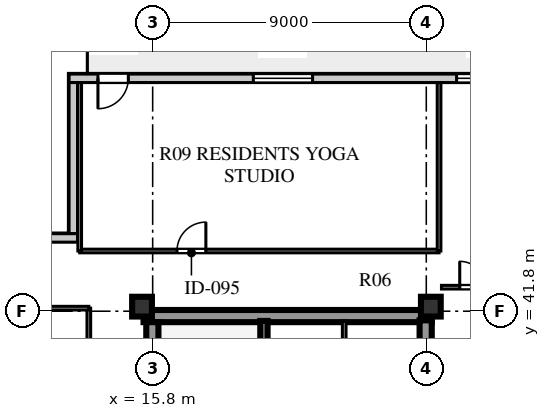
"""IFC4 building model, lengths in metres.
Left out: names, types, materials, properties, quantities, classifications, styles, units other than length and angle.
Written with IfcOpenShell. Run it as: python <this file> out.ifc"""

import sys

from ifc_helpers import new_model, si_unit, direction, frame, frame_2d, origin, origin_2d, place, context, subcontext, project, spatial, rectangle, extrude, element, fill, save


model = new_model("IFC4")
c1 = context("Model", 3, precision=1e-05, world=origin(), true_north=direction((0.0, 1.0)))
c2 = subcontext(c1, "Body", "Model", "MODEL_VIEW")
j1 = project(units=[si_unit("LENGTHUNIT", "METRE"), si_unit("PLANEANGLEUNIT", "RADIAN")], contexts=[c1])
p1 = place(None, origin())
s1 = spatial("IfcSite", under=j1, at=p1, CompositionType="ELEMENT")
p2 = place(p1, origin())
s2 = spatial("IfcBuilding", under=s1, at=p2, CompositionType="ELEMENT")
p3 = place(p2, frame((0.0, 0.0, 214.1)))
s3 = spatial("IfcBuildingStorey", under=s2, at=p3, CompositionType="ELEMENT", Elevation=214.1)
p4 = place(p3, frame((15.5, 41.64, 0.0), z_axis=(0.0, 0.0, 1.0), x_axis=(1.0, 0.0, 0.0)))
e1 = element("IfcWall", 1, at=p4, inside=s3, PredefinedType="SHEAR", context=c2, shape_type="SweptSolid", body=[
    extrude(rectangle(XDim=9.48, YDim=0.4, at=frame_2d((4.74, 0.0))), origin(), (0.0, 0.0, 1.0), 3.66),
])
p5 = place(p3, frame((15.79, 15.81, 0.0), z_axis=(0.0, 0.0, 1.0), x_axis=(0.0, 1.0, 0.0)))
e2 = element("IfcWall", 2, at=p5, inside=s3, PredefinedType="SHEAR", context=c2, shape_type="SweptSolid", body=[
    extrude(rectangle(XDim=25.63, YDim=0.4, at=frame_2d((12.815, 0.0))), origin(), (0.0, 0.0, 1.0), 3.66),
])
p6 = place(p3, frame((24.78, 15.74, 0.0), z_axis=(0.0, 0.0, 1.0), x_axis=(0.0, 1.0, 0.0)))
e3 = element("IfcWall", 3, at=p6, inside=s3, PredefinedType="SHEAR", context=c2, shape_type="SweptSolid", body=[
    extrude(rectangle(XDim=25.76, YDim=0.4, at=frame_2d((12.88, 0.0))), origin(), (0.0, 0.0, 1.0), 3.66),
])
p7 = place(p6, frame((1.61, 0.0, 0.0)))
e4 = element("IfcOpeningElement", 4, at=p7, cuts=e3, PredefinedType="OPENING", context=c2, shape_type="SweptSolid", body=[
    extrude(rectangle(XDim=1.2, YDim=2.1, at=frame_2d((0.6, 1.05))), frame((0.0, 0.21, 0.0), z_axis=(0.0, -1.0, 0.0), x_axis=(1.0, 0.0, 0.0)), (0.0, 0.0, 1.0), 0.42),
])
p8 = place(p6, frame((6.78, 0.0, 0.0)))
e5 = element("IfcOpeningElement", 5, at=p8, cuts=e3, PredefinedType="OPENING", context=c2, shape_type="SweptSolid", body=[
    extrude(rectangle(XDim=0.85, YDim=2.06, at=frame_2d((0.425, 1.03))), frame((0.0, 0.21, 0.0), z_axis=(0.0, -1.0, 0.0), x_axis=(1.0, 0.0, 0.0)), (0.0, 0.0, 1.0), 0.42),
])
p9 = place(p6, frame((12.11, 0.0, 0.0)))
e6 = element("IfcOpeningElement", 6, at=p9, cuts=e3, PredefinedType="OPENING", context=c2, shape_type="SweptSolid", body=[
    extrude(rectangle(XDim=1.5, YDim=2.12, at=frame_2d((0.75, 1.06))), frame((0.0, 0.21, 0.0), z_axis=(0.0, -1.0, 0.0), x_axis=(1.0, 0.0, 0.0)), (0.0, 0.0, 1.0), 0.42),
])
p10 = place(p6, frame((20.11, 0.0, 0.0)))
e7 = element("IfcOpeningElement", 7, at=p10, cuts=e3, PredefinedType="OPENING", context=c2, shape_type="SweptSolid", body=[
    extrude(rectangle(XDim=1.2, YDim=2.12, at=frame_2d((0.6, 1.06))), frame((0.0, 0.21, 0.0), z_axis=(0.0, -1.0, 0.0), x_axis=(1.0, 0.0, 0.0)), (0.0, 0.0, 1.0), 0.42),
])
p11 = place(p6, frame((24.01, 0.0, 0.0)))
e8 = element("IfcOpeningElement", 8, at=p11, cuts=e3, PredefinedType="OPENING", context=c2, shape_type="SweptSolid", body=[
    extrude(rectangle(XDim=0.95, YDim=2.1, at=frame_2d((0.475, 1.05))), frame((0.0, 0.21, 0.0), z_axis=(0.0, -1.0, 0.0), x_axis=(1.0, 0.0, 0.0)), (0.0, 0.0, 1.0), 0.42),
])
for number, where, z_axis, x_axis in (
    (9, (15.45, 41.95, 0.0), (0.0, 0.0, 1.0), (1.0, 0.0, 0.0)),
    (10, (24.95, 41.95, 0.0), (0.0, 0.0, 1.0), (1.0, 0.0, 0.0)),
):
    element("IfcColumn", number, at=place(p3, frame(where, z_axis=z_axis, x_axis=x_axis)), inside=s3, PredefinedType="COLUMN", context=c2, shape_type="SweptSolid", body=[
        extrude(rectangle(XDim=0.65, YDim=0.65, at=origin_2d()), origin(), (0.0, 0.0, 1.0), 3.66),
    ])
p12 = place(p3, frame((45.55, 49.46, 0.0), z_axis=(0.0, 0.0, 1.0), x_axis=(-1.0, 0.0, 0.0)))
e11 = element("IfcWall", 11, at=p12, inside=s3, PredefinedType="STANDARD", context=c2, shape_type="SweptSolid", body=[
    extrude(rectangle(XDim=32.5, YDim=0.28, at=frame_2d((16.25, 0.0))), origin(), (0.0, 0.0, 1.0), 3.66),
])
p13 = place(p12, frame((30.55, 0.0, 0.0)))
e12 = element("IfcOpeningElement", 12, at=p13, cuts=e11, PredefinedType="OPENING", context=c2, shape_type="SweptSolid", body=[
    extrude(rectangle(XDim=1.0, YDim=2.05, at=frame_2d((0.5, 1.025))), frame((0.0, 0.15, 0.0), z_axis=(0.0, -1.0, 0.0), x_axis=(1.0, 0.0, 0.0)), (0.0, 0.0, 1.0), 0.3),
])
p14 = place(p12, frame((24.49, 0.0, 0.8)))
e13 = element("IfcOpeningElement", 13, at=p14, cuts=e11, PredefinedType="OPENING", context=c2, shape_type="SweptSolid", body=[
    extrude(rectangle(XDim=1.95, YDim=2.0, at=frame_2d((0.975, 1.0))), frame((0.0, 0.15, 0.0), z_axis=(0.0, -1.0, 0.0), x_axis=(1.0, 0.0, 0.0)), (0.0, 0.0, 1.0), 0.3),
])
p15 = place(p12, frame((17.503, 0.0, 0.8)))
e14 = element("IfcOpeningElement", 14, at=p15, cuts=e11, PredefinedType="OPENING", context=c2, shape_type="SweptSolid", body=[
    extrude(rectangle(XDim=2.25, YDim=2.0, at=frame_2d((1.125, 1.0))), frame((0.0, 0.15, 0.0), z_axis=(0.0, -1.0, 0.0), x_axis=(1.0, 0.0, 0.0)), (0.0, 0.0, 1.0), 0.3),
])
p16 = place(p12, frame((12.978, 0.0, 0.8)))
e15 = element("IfcOpeningElement", 15, at=p16, cuts=e11, PredefinedType="OPENING", context=c2, shape_type="SweptSolid", body=[
    extrude(rectangle(XDim=1.8, YDim=2.0, at=frame_2d((0.9, 1.0))), frame((0.0, 0.15, 0.0), z_axis=(0.0, -1.0, 0.0), x_axis=(1.0, 0.0, 0.0)), (0.0, 0.0, 1.0), 0.3),
])
p17 = place(p12, frame((4.72, 0.0, 0.8)))
e16 = element("IfcOpeningElement", 16, at=p17, cuts=e11, PredefinedType="OPENING", context=c2, shape_type="SweptSolid", body=[
    extrude(rectangle(XDim=1.5, YDim=2.0, at=frame_2d((0.75, 1.0))), frame((0.0, 0.15, 0.0), z_axis=(0.0, -1.0, 0.0), x_axis=(1.0, 0.0, 0.0)), (0.0, 0.0, 1.0), 0.3),
])
p18 = place(p3, frame((13.19, 49.32, 0.0), z_axis=(0.0, 0.0, 1.0), x_axis=(0.0, -1.0, 0.0)))
e17 = element("IfcWall", 17, at=p18, inside=s3, PredefinedType="STANDARD", context=c2, shape_type="SweptSolid", body=[
    extrude(rectangle(XDim=4.97, YDim=0.28, at=frame_2d((2.485, 0.0))), origin(), (0.0, 0.0, 1.0), 3.66),
])
p19 = place(p3, frame((13.33, 44.21, 0.0), z_axis=(0.0, 0.0, 1.0), x_axis=(-1.0, 0.0, 0.0)))
e18 = element("IfcWall", 18, at=p19, inside=s3, PredefinedType="STANDARD", context=c2, shape_type="SweptSolid", body=[
    extrude(rectangle(XDim=5.53, YDim=0.28, at=frame_2d((2.765, 0.0))), origin(), (0.0, 0.0, 1.0), 3.66),
])
p20 = place(p3, frame((19.46, 33.3, 0.0), z_axis=(0.0, 0.0, 1.0), x_axis=(0.0, 1.0, 0.0)))
e19 = element("IfcWall", 19, at=p20, inside=s3, PredefinedType="SHEAR", context=c2, shape_type="SweptSolid", body=[
    extrude(rectangle(XDim=8.18, YDim=0.24, at=frame_2d((4.09, 0.0))), origin(), (0.0, 0.0, 1.0), 3.9),
])
p21 = place(p20, frame((0.65, 0.0, 0.0)))
e20 = element("IfcOpeningElement", 20, at=p21, cuts=e19, PredefinedType="OPENING", context=c2, shape_type="SweptSolid", body=[
    extrude(rectangle(XDim=1.1, YDim=2.1, at=frame_2d((0.55, 1.05))), frame((0.0, 0.13, 0.0), z_axis=(0.0, -1.0, 0.0), x_axis=(1.0, 0.0, 0.0)), (0.0, 0.0, 1.0), 0.26),
])
p22 = place(p3, frame((22.1, 39.4, 0.0), z_axis=(0.0, 0.0, 1.0), x_axis=(0.0, 1.0, 0.0)))
e21 = element("IfcWall", 21, at=p22, inside=s3, PredefinedType="PARTITIONING", context=c2, shape_type="SweptSolid", body=[
    extrude(rectangle(XDim=2.08, YDim=0.12, at=frame_2d((1.04, 0.0))), origin(), (0.0, 0.0, 1.0), 3.66),
])
p23 = place(p22, frame((0.55, 0.0, 0.0)))
e22 = element("IfcOpeningElement", 22, at=p23, cuts=e21, PredefinedType="OPENING", context=c2, shape_type="SweptSolid", body=[
    extrude(rectangle(XDim=0.85, YDim=2.06, at=frame_2d((0.425, 1.03))), frame((0.0, 0.07, 0.0), z_axis=(0.0, -1.0, 0.0), x_axis=(1.0, 0.0, 0.0)), (0.0, 0.0, 1.0), 0.14),
])
p24 = place(p3, frame((13.4, 43.78, 0.0), z_axis=(0.0, 0.0, 1.0), x_axis=(1.0, 0.0, 0.0)))
e23 = element("IfcWall", 23, at=p24, inside=s3, PredefinedType="PARTITIONING", context=c2, shape_type="SweptSolid", body=[
    extrude(rectangle(XDim=11.82, YDim=0.12, at=frame_2d((5.91, 0.0))), origin(), (0.0, 0.0, 1.0), 3.66),
])
p25 = place(p24, frame((3.2, 0.0, 0.0)))
e24 = element("IfcOpeningElement", 24, at=p25, cuts=e23, PredefinedType="OPENING", context=c2, shape_type="SweptSolid", body=[
    extrude(rectangle(XDim=0.95, YDim=2.08, at=frame_2d((0.475, 1.04))), frame((0.0, 0.07, 0.0), z_axis=(0.0, -1.0, 0.0), x_axis=(1.0, 0.0, 0.0)), (0.0, 0.0, 1.0), 0.14),
])
p26 = place(p3, frame((13.4, 43.78, 0.0), z_axis=(0.0, 0.0, 1.0), x_axis=(0.0, 1.0, 0.0)))
e25 = element("IfcWall", 25, at=p26, inside=s3, PredefinedType="PARTITIONING", context=c2, shape_type="SweptSolid", body=[
    extrude(rectangle(XDim=5.54, YDim=0.12, at=frame_2d((2.77, 0.0))), origin(), (0.0, 0.0, 1.0), 3.66),
])
p27 = place(p3, frame((25.22, 43.78, 0.0), z_axis=(0.0, 0.0, 1.0), x_axis=(0.0, 1.0, 0.0)))
e26 = element("IfcWall", 26, at=p27, inside=s3, PredefinedType="PARTITIONING", context=c2, shape_type="SweptSolid", body=[
    extrude(rectangle(XDim=5.54, YDim=0.12, at=frame_2d((2.77, 0.0))), origin(), (0.0, 0.0, 1.0), 3.21),
])
p28 = place(p3, frame((13.7, 15.3, 0.0), z_axis=(0.0, 0.0, 1.0), x_axis=(0.0, 1.0, 0.0)))
e27 = element("IfcWall", 27, at=p28, inside=s3, PredefinedType="PARTITIONING", context=c2, shape_type="SweptSolid", body=[
    extrude(rectangle(XDim=26.6, YDim=0.12, at=frame_2d((13.3, 0.0))), origin(), (0.0, 0.0, 1.0), 3.66),
])
p29 = place(p28, frame((0.65, 0.0, 0.0)))
e28 = element("IfcOpeningElement", 28, at=p29, cuts=e27, PredefinedType="OPENING", context=c2, shape_type="SweptSolid", body=[
    extrude(rectangle(XDim=0.95, YDim=2.1, at=frame_2d((0.475, 1.05))), frame((0.0, 0.07, 0.0), z_axis=(0.0, -1.0, 0.0), x_axis=(1.0, 0.0, 0.0)), (0.0, 0.0, 1.0), 0.14),
])
p30 = place(p28, frame((13.95, 0.0, 0.0)))
e29 = element("IfcOpeningElement", 29, at=p30, cuts=e27, PredefinedType="OPENING", context=c2, shape_type="SweptSolid", body=[
    extrude(rectangle(XDim=0.95, YDim=2.1, at=frame_2d((0.475, 1.05))), frame((0.0, 0.07, 0.0), z_axis=(0.0, -1.0, 0.0), x_axis=(1.0, 0.0, 0.0)), (0.0, 0.0, 1.0), 0.14),
])
p31 = place(p3, frame((8.08, 41.9, 0.0), z_axis=(0.0, 0.0, 1.0), x_axis=(1.0, 0.0, 0.0)))
e30 = element("IfcWall", 30, at=p31, inside=s3, PredefinedType="PARTITIONING", context=c2, shape_type="SweptSolid", body=[
    extrude(rectangle(XDim=5.62, YDim=0.12, at=frame_2d((2.81, 0.0))), origin(), (0.0, 0.0, 1.0), 3.21),
])
p32 = place(p3, frame((25.3, 42.59, 0.0), z_axis=(0.0, 0.0, 1.0), x_axis=(1.0, 0.0, 0.0)))
e31 = element("IfcWall", 31, at=p32, inside=s3, PredefinedType="PARTITIONING", context=c2, shape_type="SweptSolid", body=[
    extrude(rectangle(XDim=9.34, YDim=0.12, at=frame_2d((4.67, 0.0))), origin(), (0.0, 0.0, 1.0), 3.66),
])
p33 = place(p32, frame((0.6, 0.0, 0.0)))
e32 = element("IfcOpeningElement", 32, at=p33, cuts=e31, PredefinedType="OPENING", context=c2, shape_type="SweptSolid", body=[
    extrude(rectangle(XDim=0.85, YDim=2.08, at=frame_2d((0.425, 1.04))), frame((0.0, 0.07, 0.0), z_axis=(0.0, -1.0, 0.0), x_axis=(1.0, 0.0, 0.0)), (0.0, 0.0, 1.0), 0.14),
])
p34 = place(p32, frame((3.573, 0.0, 0.0)))
e33 = element("IfcOpeningElement", 33, at=p34, cuts=e31, PredefinedType="OPENING", context=c2, shape_type="SweptSolid", body=[
    extrude(rectangle(XDim=0.85, YDim=2.08, at=frame_2d((0.425, 1.04))), frame((0.0, 0.07, 0.0), z_axis=(0.0, -1.0, 0.0), x_axis=(1.0, 0.0, 0.0)), (0.0, 0.0, 1.0), 0.14),
])
p35 = place(p13, frame((1.0, 0.0, 0.0), z_axis=(0.0, 0.0, 1.0), x_axis=(-1.0, 0.0, 0.0)))
e34 = element("IfcDoor", 34, at=p35, inside=s3, OperationType="SINGLE_SWING_LEFT", PredefinedType="DOOR", context=c2, shape_type="SweptSolid", body=[
    extrude(rectangle(XDim=1.0, YDim=2.05, at=frame_2d((0.5, 1.025))), frame((0.0, 0.025, 0.0), z_axis=(0.0, -1.0, 0.0), x_axis=(1.0, 0.0, 0.0)), (0.0, 0.0, 1.0), 0.05),
])
fill(e12, e34)
p36 = place(p14, origin())
e35 = element("IfcWindow", 35, at=p36, inside=s3, PartitioningType="SINGLE_PANEL", PredefinedType="WINDOW", context=c2, shape_type="SweptSolid", body=[
    extrude(rectangle(XDim=1.95, YDim=2.0, at=frame_2d((0.975, 1.0))), frame((0.0, 0.03, 0.0), z_axis=(0.0, -1.0, 0.0), x_axis=(1.0, 0.0, 0.0)), (0.0, 0.0, 1.0), 0.06),
])
fill(e13, e35)
p37 = place(p15, origin())
e36 = element("IfcWindow", 36, at=p37, inside=s3, PartitioningType="SINGLE_PANEL", PredefinedType="WINDOW", context=c2, shape_type="SweptSolid", body=[
    extrude(rectangle(XDim=2.25, YDim=2.0, at=frame_2d((1.125, 1.0))), frame((0.0, 0.03, 0.0), z_axis=(0.0, -1.0, 0.0), x_axis=(1.0, 0.0, 0.0)), (0.0, 0.0, 1.0), 0.06),
])
fill(e14, e36)
p38 = place(p25, origin())
e37 = element("IfcDoor", 37, at=p38, inside=s3, OperationType="SINGLE_SWING_RIGHT", PredefinedType="DOOR", context=c2, shape_type="SweptSolid", body=[
    extrude(rectangle(XDim=0.95, YDim=2.08, at=frame_2d((0.475, 1.04))), frame((0.0, 0.025, 0.0), z_axis=(0.0, -1.0, 0.0), x_axis=(1.0, 0.0, 0.0)), (0.0, 0.0, 1.0), 0.05),
])
fill(e24, e37)
p39 = place(p33, origin())
e38 = element("IfcDoor", 38, at=p39, inside=s3, OperationType="SINGLE_SWING_LEFT", PredefinedType="DOOR", context=c2, shape_type="SweptSolid", body=[
    extrude(rectangle(XDim=0.85, YDim=2.08, at=frame_2d((0.425, 1.04))), frame((0.0, 0.025, 0.0), z_axis=(0.0, -1.0, 0.0), x_axis=(1.0, 0.0, 0.0)), (0.0, 0.0, 1.0), 0.05),
])
fill(e32, e38)
save(model, sys.argv[1])
